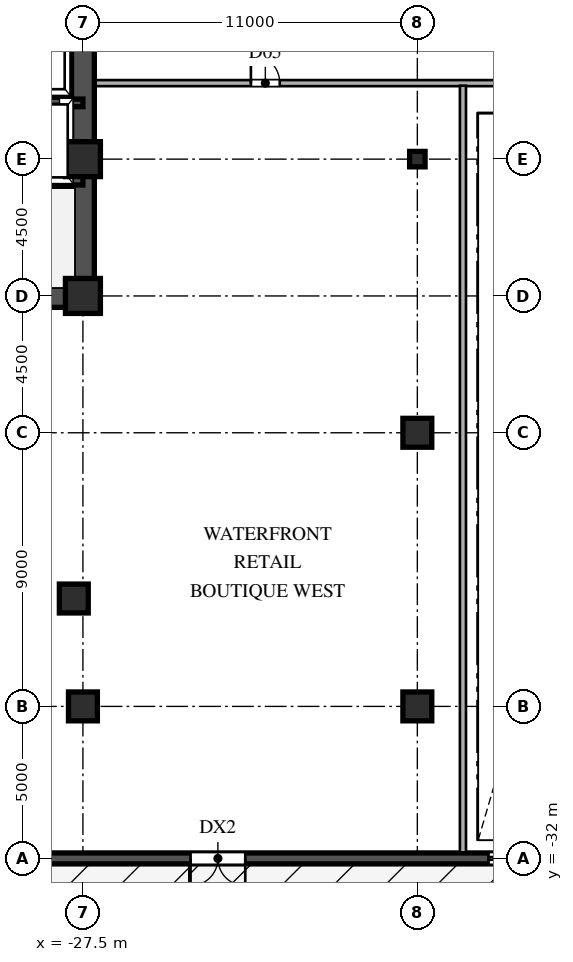
"""IFC4 building model, lengths in metres.
Left out: names, types, materials, properties, quantities, classifications, styles, units other than length and angle.
Written with IfcOpenShell. Run it as: python <this file> out.ifc"""

import sys

from ifc_helpers import new_model, si_unit, direction, frame, frame_2d, origin, origin_2d, place, context, subcontext, project, spatial, rectangle, hollow_rectangle, hollow_circle, extrude, source, transform, mapped, element, fill, save


model = new_model("IFC4")
c1 = context("Model", 3, precision=1e-05, world=origin(), true_north=direction((0.0, 1.0)))
c2 = subcontext(c1, "Body", "Model", "MODEL_VIEW")
j1 = project(units=[si_unit("LENGTHUNIT", "METRE"), si_unit("PLANEANGLEUNIT", "RADIAN")], contexts=[c1])
p1 = place(None, origin())
s1 = spatial("IfcSite", under=j1, at=p1, CompositionType="ELEMENT")
p2 = place(p1, origin())
s2 = spatial("IfcBuilding", under=s1, at=p2, CompositionType="ELEMENT")
p3 = place(p2, origin())
s3 = spatial("IfcBuildingStorey", under=s2, at=p3, CompositionType="ELEMENT", Elevation=0.0)
m1 = source(origin(), c2, "Body", "SweptSolid", [
    extrude(hollow_rectangle(XDim=1.15, YDim=1.15, WallThickness=0.048, at=origin_2d()), origin(), (0.0, 0.0, 1.0), 5.4),
])
for number, where, z_axis, x_axis in (
    (1, (-27.5, -13.5, 0.0), (0.0, 0.0, 1.0), (1.0, 0.0, 0.0)),
    (2, (-27.5, -9.0, 0.0), (0.0, 0.0, 1.0), (1.0, 0.0, 0.0)),
):
    element("IfcColumn", number, at=place(p3, frame(where, z_axis=z_axis, x_axis=x_axis)), inside=s3, PredefinedType="COLUMN", context=c2, shape_type="MappedRepresentation", body=[
        mapped(m1, transform((0.0, 0.0, 0.0), scale=1.0)),
    ])
m2 = source(origin(), c2, "Body", "SweptSolid", [
    extrude(rectangle(XDim=0.95, YDim=0.95, at=origin_2d()), origin(), (0.0, 0.0, 1.0), 5.4),
])
for number, where, z_axis, x_axis in (
    (3, (-27.5, -27.0, 0.0), (0.0, 0.0, 1.0), (1.0, 0.0, 0.0)),
    (4, (-27.8, -23.451, 0.0), (0.0, 0.0, 1.0), (1.0, 0.0, 0.0)),
    (5, (-16.5, -27.0, 0.0), (0.0, 0.0, 1.0), (1.0, 0.0, 0.0)),
    (6, (-16.5, -18.0, 0.0), (0.0, 0.0, 1.0), (1.0, 0.0, 0.0)),
):
    element("IfcColumn", number, at=place(p3, frame(where, z_axis=z_axis, x_axis=x_axis)), inside=s3, PredefinedType="COLUMN", context=c2, shape_type="MappedRepresentation", body=[
        mapped(m2, transform((0.0, 0.0, 0.0), scale=1.0)),
    ])
m3 = source(origin(), c2, "Body", "SweptSolid", [
    extrude(hollow_circle(Radius=0.254, WallThickness=0.019, at=origin_2d()), origin(), (0.0, 0.0, 1.0), 5.4),
])
p4 = place(p3, frame((-16.5, -9.0, 0.0), z_axis=(0.0, 0.0, 1.0), x_axis=(1.0, 0.0, 0.0)))
e7 = element("IfcColumn", 7, at=p4, inside=s3, PredefinedType="COLUMN", context=c2, shape_type="MappedRepresentation", body=[
    mapped(m3, transform((0.0, 0.0, 0.0), scale=1.0)),
])
p5 = place(p3, frame((-71.96, -32.0, 0.0), z_axis=(0.0, 0.0, 1.0), x_axis=(1.0, 0.0, 0.0)))
e8 = element("IfcWall", 8, at=p5, inside=s3, PredefinedType="SOLIDWALL", context=c2, shape_type="SweptSolid", body=[
    extrude(rectangle(XDim=143.92, YDim=0.36, at=frame_2d((71.96, 0.0))), origin(), (0.0, 0.0, 1.0), 5.12),
])
p6 = place(p5, frame((18.0, 0.0, 0.0)))
e9 = element("IfcOpeningElement", 9, at=p6, cuts=e8, PredefinedType="OPENING", context=c2, shape_type="SweptSolid", body=[
    extrude(rectangle(XDim=2.2, YDim=2.4, at=frame_2d((1.1, 1.2))), frame((0.0, 0.19, 0.0), z_axis=(0.0, -1.0, 0.0), x_axis=(1.0, 0.0, 0.0)), (0.0, 0.0, 1.0), 0.38),
])
p7 = place(p5, frame((48.0, 0.0, 0.0)))
e10 = element("IfcOpeningElement", 10, at=p7, cuts=e8, PredefinedType="OPENING", context=c2, shape_type="SweptSolid", body=[
    extrude(rectangle(XDim=1.8, YDim=2.4, at=frame_2d((0.9, 1.2))), frame((0.0, 0.19, 0.0), z_axis=(0.0, -1.0, 0.0), x_axis=(1.0, 0.0, 0.0)), (0.0, 0.0, 1.0), 0.38),
])
p8 = place(p5, frame((57.8, 0.0, 0.0)))
e11 = element("IfcOpeningElement", 11, at=p8, cuts=e8, PredefinedType="OPENING", context=c2, shape_type="SweptSolid", body=[
    extrude(rectangle(XDim=6.2, YDim=3.1, at=frame_2d((3.1, 1.55))), frame((0.0, 0.19, 0.0), z_axis=(0.0, -1.0, 0.0), x_axis=(1.0, 0.0, 0.0)), (0.0, 0.0, 1.0), 0.38),
])
p9 = place(p5, frame((70.7, 0.0, 0.0)))
e12 = element("IfcOpeningElement", 12, at=p9, cuts=e8, PredefinedType="OPENING", context=c2, shape_type="SweptSolid", body=[
    extrude(rectangle(XDim=2.2, YDim=2.4, at=frame_2d((1.1, 1.2))), frame((0.0, 0.19, 0.0), z_axis=(0.0, -1.0, 0.0), x_axis=(1.0, 0.0, 0.0)), (0.0, 0.0, 1.0), 0.38),
])
p10 = place(p5, frame((82.2, 0.0, 0.0)))
e13 = element("IfcOpeningElement", 13, at=p10, cuts=e8, PredefinedType="OPENING", context=c2, shape_type="SweptSolid", body=[
    extrude(rectangle(XDim=1.8, YDim=2.4, at=frame_2d((0.9, 1.2))), frame((0.0, 0.19, 0.0), z_axis=(0.0, -1.0, 0.0), x_axis=(1.0, 0.0, 0.0)), (0.0, 0.0, 1.0), 0.38),
])
p11 = place(p5, frame((120.2, 0.0, 0.0)))
e14 = element("IfcOpeningElement", 14, at=p11, cuts=e8, PredefinedType="OPENING", context=c2, shape_type="SweptSolid", body=[
    extrude(rectangle(XDim=2.2, YDim=2.4, at=frame_2d((1.1, 1.2))), frame((0.0, 0.19, 0.0), z_axis=(0.0, -1.0, 0.0), x_axis=(1.0, 0.0, 0.0)), (0.0, 0.0, 1.0), 0.38),
])
p12 = place(p5, frame((36.51, 0.0, 0.0)))
e15 = element("IfcOpeningElement", 15, at=p12, cuts=e8, PredefinedType="OPENING", context=c2, shape_type="SweptSolid", body=[
    extrude(rectangle(XDim=2.2, YDim=2.4, at=frame_2d((1.1, 1.2))), frame((0.0, 0.19, 0.0), z_axis=(0.0, -1.0, 0.0), x_axis=(1.0, 0.0, 0.0)), (0.0, 0.0, 1.0), 0.38),
])
p13 = place(p5, frame((105.21, 0.0, 0.0)))
e16 = element("IfcOpeningElement", 16, at=p13, cuts=e8, PredefinedType="OPENING", context=c2, shape_type="SweptSolid", body=[
    extrude(rectangle(XDim=2.2, YDim=2.4, at=frame_2d((1.1, 1.2))), frame((0.0, 0.19, 0.0), z_axis=(0.0, -1.0, 0.0), x_axis=(1.0, 0.0, 0.0)), (0.0, 0.0, 1.0), 0.38),
])
p14 = place(p5, frame((6.0, 0.0, 0.9)))
e17 = element("IfcOpeningElement", 17, at=p14, cuts=e8, PredefinedType="OPENING", context=c2, shape_type="SweptSolid", body=[
    extrude(rectangle(XDim=2.4, YDim=2.2, at=frame_2d((1.2, 1.1))), frame((0.0, 0.19, 0.0), z_axis=(0.0, -1.0, 0.0), x_axis=(1.0, 0.0, 0.0)), (0.0, 0.0, 1.0), 0.38),
])
p15 = place(p5, frame((12.0, 0.0, 0.9)))
e18 = element("IfcOpeningElement", 18, at=p15, cuts=e8, PredefinedType="OPENING", context=c2, shape_type="SweptSolid", body=[
    extrude(rectangle(XDim=2.4, YDim=2.2, at=frame_2d((1.2, 1.1))), frame((0.0, 0.19, 0.0), z_axis=(0.0, -1.0, 0.0), x_axis=(1.0, 0.0, 0.0)), (0.0, 0.0, 1.0), 0.38),
])
p16 = place(p5, frame((28.0, 0.0, 0.9)))
e19 = element("IfcOpeningElement", 19, at=p16, cuts=e8, PredefinedType="OPENING", context=c2, shape_type="SweptSolid", body=[
    extrude(rectangle(XDim=2.4, YDim=2.2, at=frame_2d((1.2, 1.1))), frame((0.0, 0.19, 0.0), z_axis=(0.0, -1.0, 0.0), x_axis=(1.0, 0.0, 0.0)), (0.0, 0.0, 1.0), 0.38),
])
p17 = place(p5, frame((91.0, 0.0, 0.9)))
e20 = element("IfcOpeningElement", 20, at=p17, cuts=e8, PredefinedType="OPENING", context=c2, shape_type="SweptSolid", body=[
    extrude(rectangle(XDim=2.4, YDim=2.2, at=frame_2d((1.2, 1.1))), frame((0.0, 0.19, 0.0), z_axis=(0.0, -1.0, 0.0), x_axis=(1.0, 0.0, 0.0)), (0.0, 0.0, 1.0), 0.38),
])
p18 = place(p5, frame((102.0, 0.0, 0.9)))
e21 = element("IfcOpeningElement", 21, at=p18, cuts=e8, PredefinedType="OPENING", context=c2, shape_type="SweptSolid", body=[
    extrude(rectangle(XDim=2.4, YDim=2.2, at=frame_2d((1.2, 1.1))), frame((0.0, 0.19, 0.0), z_axis=(0.0, -1.0, 0.0), x_axis=(1.0, 0.0, 0.0)), (0.0, 0.0, 1.0), 0.38),
])
p19 = place(p5, frame((110.0, 0.0, 0.9)))
e22 = element("IfcOpeningElement", 22, at=p19, cuts=e8, PredefinedType="OPENING", context=c2, shape_type="SweptSolid", body=[
    extrude(rectangle(XDim=2.4, YDim=2.2, at=frame_2d((1.2, 1.1))), frame((0.0, 0.19, 0.0), z_axis=(0.0, -1.0, 0.0), x_axis=(1.0, 0.0, 0.0)), (0.0, 0.0, 1.0), 0.38),
])
p20 = place(p5, frame((130.0, 0.0, 0.9)))
e23 = element("IfcOpeningElement", 23, at=p20, cuts=e8, PredefinedType="OPENING", context=c2, shape_type="SweptSolid", body=[
    extrude(rectangle(XDim=2.4, YDim=2.2, at=frame_2d((1.2, 1.1))), frame((0.0, 0.19, 0.0), z_axis=(0.0, -1.0, 0.0), x_axis=(1.0, 0.0, 0.0)), (0.0, 0.0, 1.0), 0.38),
])
p21 = place(p3, frame((-27.5, -13.5, 0.0), z_axis=(0.0, 0.0, 1.0), x_axis=(0.0, 1.0, 0.0)))
e24 = element("IfcWall", 24, at=p21, inside=s3, PredefinedType="SHEAR", context=c2, shape_type="SweptSolid", body=[
    extrude(rectangle(XDim=12.2, YDim=0.75, at=frame_2d((6.1, 0.0))), origin(), (0.0, 0.0, 1.0), 5.12),
])
p22 = place(p3, frame((-36.5, -13.5, 0.0), z_axis=(0.0, 0.0, 1.0), x_axis=(1.0, 0.0, 0.0)))
e25 = element("IfcWall", 25, at=p22, inside=s3, PredefinedType="SHEAR", context=c2, shape_type="SweptSolid", body=[
    extrude(rectangle(XDim=9.0, YDim=0.75, at=frame_2d((4.5, 0.0))), origin(), (0.0, 0.0, 1.0), 5.12),
])
p23 = place(p22, frame((0.6, 0.0, 0.0)))
e26 = element("IfcOpeningElement", 26, at=p23, cuts=e25, PredefinedType="OPENING", context=c2, shape_type="SweptSolid", body=[
    extrude(rectangle(XDim=1.1, YDim=2.2, at=frame_2d((0.55, 1.1))), frame((0.0, 0.385, 0.0), z_axis=(0.0, -1.0, 0.0), x_axis=(1.0, 0.0, 0.0)), (0.0, 0.0, 1.0), 0.77),
])
p24 = place(p3, frame((-36.5, -9.7, 0.0), z_axis=(0.0, 0.0, 1.0), x_axis=(1.0, 0.0, 0.0)))
e27 = element("IfcWall", 27, at=p24, inside=s3, PredefinedType="SHEAR", context=c2, shape_type="SweptSolid", body=[
    extrude(rectangle(XDim=9.0, YDim=0.3, at=frame_2d((4.5, 0.0))), origin(), (0.0, 0.0, 1.0), 5.12),
])
p25 = place(p24, frame((0.6, 0.0, 0.0)))
e28 = element("IfcOpeningElement", 28, at=p25, cuts=e27, PredefinedType="OPENING", context=c2, shape_type="SweptSolid", body=[
    extrude(rectangle(XDim=1.1, YDim=2.2, at=frame_2d((0.55, 1.1))), frame((0.0, 0.16, 0.0), z_axis=(0.0, -1.0, 0.0), x_axis=(1.0, 0.0, 0.0)), (0.0, 0.0, 1.0), 0.32),
])
p26 = place(p3, frame((-30.3, -7.15, 0.0), z_axis=(0.0, 0.0, 1.0), x_axis=(1.0, 0.0, 0.0)))
e29 = element("IfcWall", 29, at=p26, inside=s3, PredefinedType="SHEAR", context=c2, shape_type="SweptSolid", body=[
    extrude(rectangle(XDim=2.8, YDim=0.25, at=frame_2d((1.4, 0.0))), origin(), (0.0, 0.0, 1.0), 5.12),
])
p27 = place(p3, frame((-27.12, -6.5, 0.0), z_axis=(0.0, 0.0, 1.0), x_axis=(1.0, 0.0, 0.0)))
e30 = element("IfcWall", 30, at=p27, inside=s3, PredefinedType="PARTITIONING", context=c2, shape_type="SweptSolid", body=[
    extrude(rectangle(XDim=54.24, YDim=0.2, at=frame_2d((27.12, 0.0))), origin(), (0.0, 0.0, 1.0), 5.12),
])
p28 = place(p27, frame((5.145, 0.0, 0.0)))
e31 = element("IfcOpeningElement", 31, at=p28, cuts=e30, PredefinedType="OPENING", context=c2, shape_type="SweptSolid", body=[
    extrude(rectangle(XDim=0.95, YDim=2.15, at=frame_2d((0.475, 1.075))), frame((0.0, 0.11, 0.0), z_axis=(0.0, -1.0, 0.0), x_axis=(1.0, 0.0, 0.0)), (0.0, 0.0, 1.0), 0.22),
])
p29 = place(p27, frame((37.645, 0.0, 0.0)))
e32 = element("IfcOpeningElement", 32, at=p29, cuts=e30, PredefinedType="OPENING", context=c2, shape_type="SweptSolid", body=[
    extrude(rectangle(XDim=0.95, YDim=2.15, at=frame_2d((0.475, 1.075))), frame((0.0, 0.11, 0.0), z_axis=(0.0, -1.0, 0.0), x_axis=(1.0, 0.0, 0.0)), (0.0, 0.0, 1.0), 0.22),
])
p30 = place(p3, frame((-15.0, -31.8, 0.0), z_axis=(0.0, 0.0, 1.0), x_axis=(0.0, 1.0, 0.0)))
e33 = element("IfcWall", 33, at=p30, inside=s3, PredefinedType="PARTITIONING", context=c2, shape_type="SweptSolid", body=[
    extrude(rectangle(XDim=25.215, YDim=0.2, at=frame_2d((12.607, 0.0))), origin(), (0.0, 0.0, 1.0), 5.12),
])
m4 = source(origin(), c2, "Body", "SweptSolid", [
    extrude(rectangle(XDim=1.8, YDim=2.4, at=frame_2d((0.9, 1.2))), frame((0.0, 0.025, 0.0), z_axis=(0.0, -1.0, 0.0), x_axis=(1.0, 0.0, 0.0)), (0.0, 0.0, 1.0), 0.05),
])
p31 = place(p7, frame((1.8, 0.0, 0.0), z_axis=(0.0, 0.0, 1.0), x_axis=(-1.0, 0.0, 0.0)))
e34 = element("IfcDoor", 34, at=p31, inside=s3, OperationType="DOUBLE_SWING_LEFT", PredefinedType="DOOR", context=c2, shape_type="MappedRepresentation", body=[
    mapped(m4, transform((0.0, 0.0, 0.0), scale=1.0)),
])
fill(e10, e34)
m5 = source(origin(), c2, "Body", "SweptSolid", [
    extrude(rectangle(XDim=6.2, YDim=3.1, at=frame_2d((3.1, 1.55))), frame((0.0, 0.025, 0.0), z_axis=(0.0, -1.0, 0.0), x_axis=(1.0, 0.0, 0.0)), (0.0, 0.0, 1.0), 0.05),
])
p32 = place(p8, frame((6.2, 0.0, 0.0), z_axis=(0.0, 0.0, 1.0), x_axis=(-1.0, 0.0, 0.0)))
e35 = element("IfcDoor", 35, at=p32, inside=s3, OperationType="ROLLINGUP", PredefinedType="GATE", context=c2, shape_type="MappedRepresentation", body=[
    mapped(m5, transform((0.0, 0.0, 0.0), scale=1.0)),
])
fill(e11, e35)
m6 = source(origin(), c2, "Body", "SweptSolid", [
    extrude(rectangle(XDim=0.95, YDim=2.15, at=frame_2d((0.475, 1.075))), frame((0.0, 0.025, 0.0), z_axis=(0.0, -1.0, 0.0), x_axis=(1.0, 0.0, 0.0)), (0.0, 0.0, 1.0), 0.05),
])
p33 = place(p28, origin())
e36 = element("IfcDoor", 36, at=p33, inside=s3, OperationType="SINGLE_SWING_LEFT", PredefinedType="DOOR", context=c2, shape_type="MappedRepresentation", body=[
    mapped(m6, transform((0.0, 0.0, 0.0), scale=1.0)),
])
fill(e31, e36)
save(model, sys.argv[1])
